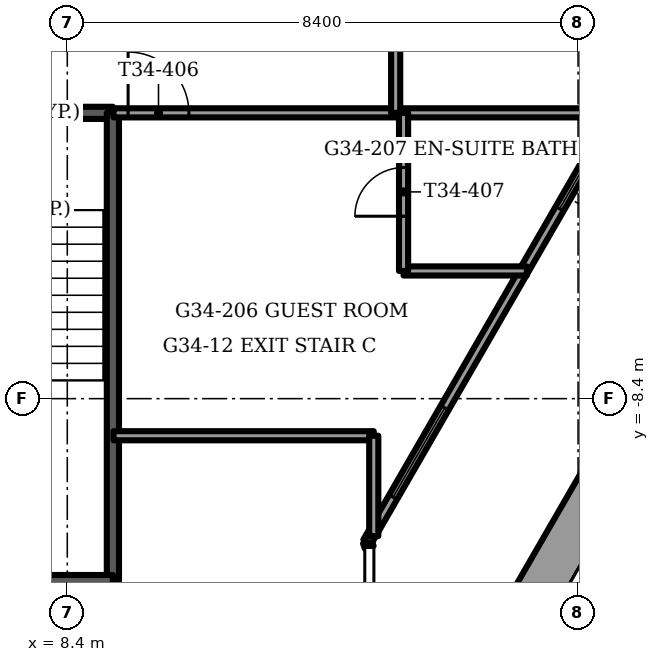
"""IFC4 building model, lengths in metres.
Left out: names, types, materials, properties, quantities, classifications, styles, units other than length and angle.
Written with IfcOpenShell. Run it as: python <this file> out.ifc"""

import sys

from ifc_helpers import new_model, si_unit, direction, frame, frame_2d, origin, place, context, subcontext, project, spatial, rectangle, extrude, element, fill, save


model = new_model("IFC4")
c1 = context("Model", 3, precision=1e-05, world=origin(), true_north=direction((0.0, 1.0)))
c2 = subcontext(c1, "Body", "Model", "MODEL_VIEW")
j1 = project(units=[si_unit("LENGTHUNIT", "METRE"), si_unit("PLANEANGLEUNIT", "RADIAN")], contexts=[c1])
p1 = place(None, origin())
s1 = spatial("IfcSite", under=j1, at=p1, CompositionType="ELEMENT")
p2 = place(p1, origin())
s2 = spatial("IfcBuilding", under=s1, at=p2, CompositionType="ELEMENT")
p3 = place(p2, frame((0.0, 0.0, 138.5)))
s3 = spatial("IfcBuildingStorey", under=s2, at=p3, CompositionType="ELEMENT", Elevation=138.5)
p4 = place(p3, frame((15.522, -12.815, 0.0), z_axis=(0.0, 0.0, 1.0), x_axis=(0.499999023957, 0.866025967302, 0.0)))
e1 = element("IfcWall", 1, at=p4, inside=s3, PredefinedType="PARAPET", context=c2, shape_type="SweptSolid", body=[
    extrude(rectangle(XDim=6.673, YDim=0.9, at=frame_2d((3.337, 0.0))), origin(), (0.0, 0.0, 1.0), 1.1),
])
p5 = place(p3, frame((13.334, -10.755, 0.0), z_axis=(0.0, 0.0, 1.0), x_axis=(0.499994317138, 0.866028684761, 0.0)))
e2 = element("IfcWall", 2, at=p5, inside=s3, PredefinedType="SOLIDWALL", context=c2, shape_type="SweptSolid", body=[
    extrude(rectangle(XDim=10.468, YDim=0.15, at=frame_2d((5.234, 0.0))), origin(), (0.0, 0.0, 1.0), 3.45),
])
p6 = place(p5, frame((0.847, 0.0, 0.15)))
e3 = element("IfcOpeningElement", 3, at=p6, cuts=e2, PredefinedType="OPENING", context=c2, shape_type="SweptSolid", body=[
    extrude(rectangle(XDim=1.7, YDim=2.2, at=frame_2d((0.85, 1.1))), frame((0.0, 0.075, 0.0), z_axis=(0.0, -1.0, 0.0), x_axis=(1.0, 0.0, 0.0)), (0.0, 0.0, 1.0), 0.15),
])
p7 = place(p5, frame((6.322, 0.0, 0.15)))
e4 = element("IfcOpeningElement", 4, at=p7, cuts=e2, PredefinedType="OPENING", context=c2, shape_type="SweptSolid", body=[
    extrude(rectangle(XDim=1.5, YDim=2.2, at=frame_2d((0.75, 1.1))), frame((0.0, 0.075, 0.0), z_axis=(0.0, -1.0, 0.0), x_axis=(1.0, 0.0, 0.0)), (0.0, 0.0, 1.0), 0.15),
])
p8 = place(p3, frame((13.334, -10.755, 0.0), z_axis=(0.0, 0.0, 1.0), x_axis=(0.337751931921, -0.941235163221, 0.0)))
e5 = element("IfcWall", 5, at=p8, inside=s3, PredefinedType="SOLIDWALL", context=c2, shape_type="SweptSolid", body=[
    extrude(rectangle(XDim=0.098, YDim=0.15, at=frame_2d((0.049, 0.0))), origin(), (0.0, 0.0, 1.0), 3.45),
])
p9 = place(p3, frame((5.8, -3.7, -0.3), z_axis=(0.0, 0.0, 1.0), x_axis=(1.0, 0.0, 0.0)))
e6 = element("IfcWall", 6, at=p9, inside=s3, PredefinedType="SOLIDWALL", context=c2, shape_type="SweptSolid", body=[
    extrude(rectangle(XDim=3.35, YDim=0.2, at=frame_2d((1.675, 0.0))), origin(), (0.0, 0.0, 1.0), 3.75),
])
p10 = place(p9, frame((1.125, 0.0, 0.0)))
e7 = element("IfcOpeningElement", 7, at=p10, cuts=e6, PredefinedType="OPENING", context=c2, shape_type="SweptSolid", body=[
    extrude(rectangle(XDim=1.1, YDim=2.1, at=frame_2d((0.55, 1.05))), frame((0.0, 0.1, 0.0), z_axis=(0.0, -1.0, 0.0), x_axis=(1.0, 0.0, 0.0)), (0.0, 0.0, 1.0), 0.2),
])
p11 = place(p3, frame((9.15, -3.7, -0.3), z_axis=(0.0, 0.0, 1.0), x_axis=(0.0, -1.0, 0.0)))
e8 = element("IfcWall", 8, at=p11, inside=s3, PredefinedType="SOLIDWALL", context=c2, shape_type="SweptSolid", body=[
    extrude(rectangle(XDim=7.7, YDim=0.2, at=frame_2d((3.85, 0.0))), origin(), (0.0, 0.0, 1.0), 3.75),
])
p12 = place(p3, frame((5.8, -11.4, -0.3), z_axis=(0.0, 0.0, 1.0), x_axis=(1.0, 0.0, 0.0)))
e9 = element("IfcWall", 9, at=p12, inside=s3, PredefinedType="SOLIDWALL", context=c2, shape_type="SweptSolid", body=[
    extrude(rectangle(XDim=3.35, YDim=0.2, at=frame_2d((1.675, 0.0))), origin(), (0.0, 0.0, 1.0), 3.75),
])
p13 = place(p3, frame((9.16, -9.01, 0.0), z_axis=(0.0, 0.0, 1.0), x_axis=(1.0, 0.0, 0.0)))
e10 = element("IfcWall", 10, at=p13, inside=s3, PredefinedType="PARTITIONING", context=c2, shape_type="SweptSolid", body=[
    extrude(rectangle(XDim=4.28, YDim=0.15, at=frame_2d((2.14, 0.0))), origin(), (0.0, 0.0, 1.0), 3.45),
])
p14 = place(p3, frame((13.93, -6.3, 0.0), z_axis=(0.0, 0.0, 1.0), x_axis=(1.0, 0.0, 0.0)))
e11 = element("IfcWall", 11, at=p14, inside=s3, PredefinedType="PARTITIONING", context=c2, shape_type="SweptSolid", body=[
    extrude(rectangle(XDim=2.028, YDim=0.15, at=frame_2d((1.014, 0.0))), origin(), (0.0, 0.0, 1.0), 3.45),
])
p15 = place(p3, frame((9.16, -3.7, 0.0), z_axis=(0.0, 0.0, 1.0), x_axis=(1.0, 0.0, 0.0)))
e12 = element("IfcWall", 12, at=p15, inside=s3, PredefinedType="PARTITIONING", context=c2, shape_type="SweptSolid", body=[
    extrude(rectangle(XDim=8.299, YDim=0.15, at=frame_2d((4.149, 0.0))), origin(), (0.0, 0.0, 1.0), 3.45),
])
p16 = place(p15, frame((0.24, 0.0, 0.0)))
e13 = element("IfcOpeningElement", 13, at=p16, cuts=e12, PredefinedType="OPENING", context=c2, shape_type="SweptSolid", body=[
    extrude(rectangle(XDim=1.0, YDim=2.1, at=frame_2d((0.5, 1.05))), frame((0.0, 0.075, 0.0), z_axis=(0.0, -1.0, 0.0), x_axis=(1.0, 0.0, 0.0)), (0.0, 0.0, 1.0), 0.15),
])
p17 = place(p3, frame((13.93, -6.3, 0.0), z_axis=(0.0, 0.0, 1.0), x_axis=(0.0, 1.0, 0.0)))
e14 = element("IfcWall", 14, at=p17, inside=s3, PredefinedType="PARTITIONING", context=c2, shape_type="SweptSolid", body=[
    extrude(rectangle(XDim=2.6, YDim=0.15, at=frame_2d((1.3, 0.0))), origin(), (0.0, 0.0, 1.0), 3.45),
])
p18 = place(p17, frame((0.9, 0.0, 0.0)))
e15 = element("IfcOpeningElement", 15, at=p18, cuts=e14, PredefinedType="OPENING", context=c2, shape_type="SweptSolid", body=[
    extrude(rectangle(XDim=0.8, YDim=2.1, at=frame_2d((0.4, 1.05))), frame((0.0, 0.075, 0.0), z_axis=(0.0, -1.0, 0.0), x_axis=(1.0, 0.0, 0.0)), (0.0, 0.0, 1.0), 0.15),
])
p19 = place(p3, frame((13.8, -3.7, 0.0), z_axis=(0.0, 0.0, 1.0), x_axis=(0.0, 1.0, 0.0)))
e16 = element("IfcWall", 16, at=p19, inside=s3, PredefinedType="PARTITIONING", context=c2, shape_type="SweptSolid", body=[
    extrude(rectangle(XDim=11.425, YDim=0.15, at=frame_2d((5.712, 0.0))), origin(), (0.0, 0.0, 1.0), 3.45),
])
p20 = place(p19, frame((2.65, 0.0, 0.0)))
e17 = element("IfcOpeningElement", 17, at=p20, cuts=e16, PredefinedType="OPENING", context=c2, shape_type="SweptSolid", body=[
    extrude(rectangle(XDim=1.0, YDim=2.1, at=frame_2d((0.5, 1.05))), frame((0.0, 0.075, 0.0), z_axis=(0.0, -1.0, 0.0), x_axis=(1.0, 0.0, 0.0)), (0.0, 0.0, 1.0), 0.15),
])
p21 = place(p19, frame((8.24, 0.0, 0.0)))
e18 = element("IfcOpeningElement", 18, at=p21, cuts=e16, PredefinedType="OPENING", context=c2, shape_type="SweptSolid", body=[
    extrude(rectangle(XDim=1.0, YDim=2.1, at=frame_2d((0.5, 1.05))), frame((0.0, 0.075, 0.0), z_axis=(0.0, -1.0, 0.0), x_axis=(1.0, 0.0, 0.0)), (0.0, 0.0, 1.0), 0.15),
])
p22 = place(p3, frame((13.44, -10.661, 0.0), z_axis=(0.0, 0.0, 1.0), x_axis=(0.0, 1.0, 0.0)))
e19 = element("IfcWall", 19, at=p22, inside=s3, PredefinedType="PARTITIONING", context=c2, shape_type="SweptSolid", body=[
    extrude(rectangle(XDim=1.651, YDim=0.15, at=frame_2d((0.825, 0.0))), origin(), (0.0, 0.0, 1.0), 3.45),
])
p23 = place(p6, origin())
e20 = element("IfcWindow", 20, at=p23, inside=s3, PartitioningType="SINGLE_PANEL", PredefinedType="WINDOW", context=c2, shape_type="SweptSolid", body=[
    extrude(rectangle(XDim=1.7, YDim=2.2, at=frame_2d((0.85, 1.1))), frame((0.0, 0.03, 0.0), z_axis=(0.0, -1.0, 0.0), x_axis=(1.0, 0.0, 0.0)), (0.0, 0.0, 1.0), 0.06),
])
fill(e3, e20)
p24 = place(p7, origin())
e21 = element("IfcWindow", 21, at=p24, inside=s3, PartitioningType="SINGLE_PANEL", PredefinedType="WINDOW", context=c2, shape_type="SweptSolid", body=[
    extrude(rectangle(XDim=1.5, YDim=2.2, at=frame_2d((0.75, 1.1))), frame((0.0, 0.03, 0.0), z_axis=(0.0, -1.0, 0.0), x_axis=(1.0, 0.0, 0.0)), (0.0, 0.0, 1.0), 0.06),
])
fill(e4, e21)
p25 = place(p16, origin())
e22 = element("IfcDoor", 22, at=p25, inside=s3, OperationType="SINGLE_SWING_LEFT", PredefinedType="DOOR", context=c2, shape_type="SweptSolid", body=[
    extrude(rectangle(XDim=1.0, YDim=2.1, at=frame_2d((0.5, 1.05))), frame((0.0, 0.025, 0.0), z_axis=(0.0, -1.0, 0.0), x_axis=(1.0, 0.0, 0.0)), (0.0, 0.0, 1.0), 0.05),
])
fill(e13, e22)
p26 = place(p18, origin())
e23 = element("IfcDoor", 23, at=p26, inside=s3, OperationType="SINGLE_SWING_RIGHT", PredefinedType="DOOR", context=c2, shape_type="SweptSolid", body=[
    extrude(rectangle(XDim=0.8, YDim=2.1, at=frame_2d((0.4, 1.05))), frame((0.0, 0.025, 0.0), z_axis=(0.0, -1.0, 0.0), x_axis=(1.0, 0.0, 0.0)), (0.0, 0.0, 1.0), 0.05),
])
fill(e15, e23)
save(model, sys.argv[1])
